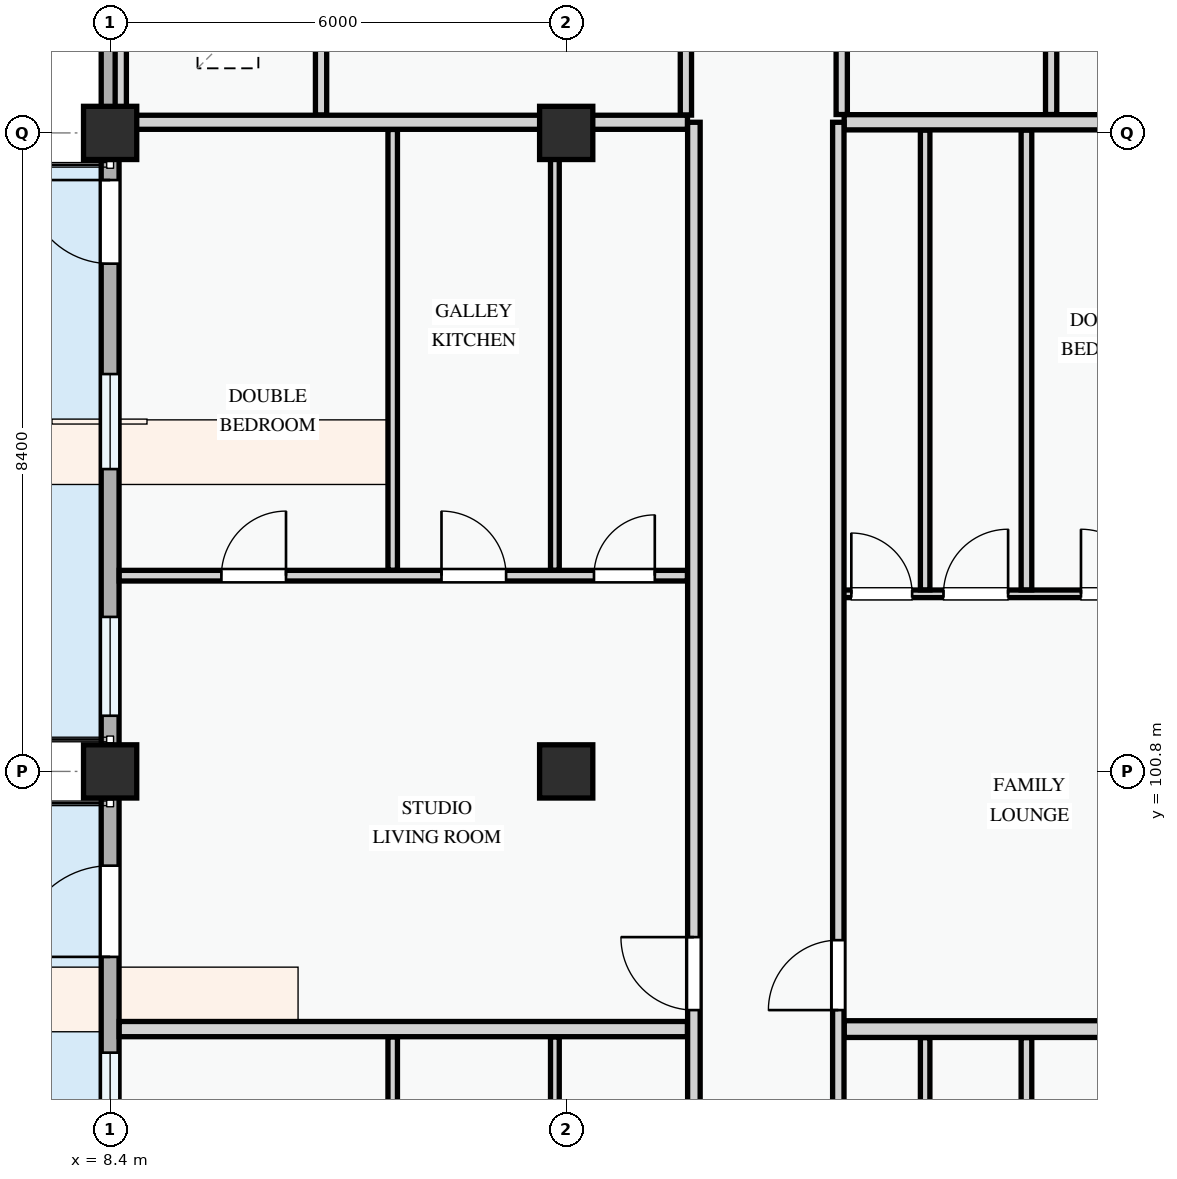
"""IFC4 building model, lengths in metres.
Left out: names, types, materials, properties, quantities, classifications, styles, units other than length and angle.
Written with IfcOpenShell. Run it as: python <this file> out.ifc"""

import sys

from ifc_helpers import new_model, si_unit, direction, frame, frame_2d, origin, origin_2d, place, context, subcontext, project, spatial, rectangle, extrude, element, fill, save


model = new_model("IFC4")
c1 = context("Model", 3, precision=1e-05, world=origin(), true_north=direction((0.0, 1.0)))
c2 = subcontext(c1, "Body", "Model", "MODEL_VIEW")
j1 = project(units=[si_unit("LENGTHUNIT", "METRE"), si_unit("PLANEANGLEUNIT", "RADIAN")], contexts=[c1])
p1 = place(None, origin())
s1 = spatial("IfcSite", under=j1, at=p1, CompositionType="ELEMENT")
p2 = place(p1, origin())
s2 = spatial("IfcBuilding", under=s1, at=p2, CompositionType="ELEMENT")
p3 = place(p2, frame((0.0, 0.0, 11.4)))
s3 = spatial("IfcBuildingStorey", under=s2, at=p3, CompositionType="ELEMENT", Elevation=11.4)
for number, where, z_axis, x_axis in (
    (1, (8.4, 100.8, 0.0), (0.0, 0.0, 1.0), (1.0, 0.0, 0.0)),
    (2, (8.4, 109.2, 0.0), (0.0, 0.0, 1.0), (1.0, 0.0, 0.0)),
    (3, (14.4, 100.8, 0.0), (0.0, 0.0, 1.0), (1.0, 0.0, 0.0)),
    (4, (14.4, 109.2, 0.0), (0.0, 0.0, 1.0), (1.0, 0.0, 0.0)),
):
    element("IfcColumn", number, at=place(p3, frame(where, z_axis=z_axis, x_axis=x_axis)), inside=s3, PredefinedType="COLUMN", context=c2, shape_type="SweptSolid", body=[
        extrude(rectangle(XDim=0.7, YDim=0.7, at=origin_2d()), origin(), (0.0, 0.0, 1.0), 3.3),
    ])
p4 = place(p3, frame((8.4, 115.2, 0.0), z_axis=(0.0, 0.0, 1.0), x_axis=(0.0, -1.0, 0.0)))
e5 = element("IfcWall", 5, at=p4, inside=s3, PredefinedType="STANDARD", context=c2, shape_type="SweptSolid", body=[
    extrude(rectangle(XDim=6.0, YDim=0.235, at=frame_2d((3.0, 0.0))), origin(), (0.0, 0.0, 1.0), 2.575),
])
p5 = place(p4, frame((0.545, 0.0, 0.78)))
e6 = element("IfcOpeningElement", 6, at=p5, cuts=e5, PredefinedType="OPENING", context=c2, shape_type="SweptSolid", body=[
    extrude(rectangle(XDim=0.9, YDim=1.2, at=frame_2d((0.45, 0.6))), frame((0.0, 0.127, 0.0), z_axis=(0.0, -1.0, 0.0), x_axis=(1.0, 0.0, 0.0)), (0.0, 0.0, 1.0), 0.255),
])
p6 = place(p4, frame((2.865, 0.0, 0.78)))
e7 = element("IfcOpeningElement", 7, at=p6, cuts=e5, PredefinedType="OPENING", context=c2, shape_type="SweptSolid", body=[
    extrude(rectangle(XDim=1.88, YDim=1.52, at=frame_2d((0.94, 0.76))), frame((0.0, 0.127, 0.0), z_axis=(0.0, -1.0, 0.0), x_axis=(1.0, 0.0, 0.0)), (0.0, 0.0, 1.0), 0.255),
])
p7 = place(p3, frame((8.4, 109.2, 0.0), z_axis=(0.0, 0.0, 1.0), x_axis=(0.0, -1.0, 0.0)))
e8 = element("IfcWall", 8, at=p7, inside=s3, PredefinedType="STANDARD", context=c2, shape_type="SweptSolid", body=[
    extrude(rectangle(XDim=8.4, YDim=0.235, at=frame_2d((4.2, 0.0))), origin(), (0.0, 0.0, 1.0), 2.425),
])
p8 = place(p7, frame((0.62, 0.0, 0.0)))
e9 = element("IfcOpeningElement", 9, at=p8, cuts=e8, PredefinedType="OPENING", context=c2, shape_type="SweptSolid", body=[
    extrude(rectangle(XDim=1.1, YDim=2.15, at=frame_2d((0.55, 1.075))), frame((0.0, 0.127, 0.0), z_axis=(0.0, -1.0, 0.0), x_axis=(1.0, 0.0, 0.0)), (0.0, 0.0, 1.0), 0.255),
])
p9 = place(p7, frame((3.173, 0.0, 0.78)))
e10 = element("IfcOpeningElement", 10, at=p9, cuts=e8, PredefinedType="OPENING", context=c2, shape_type="SweptSolid", body=[
    extrude(rectangle(XDim=1.25, YDim=1.45, at=frame_2d((0.625, 0.725))), frame((0.0, 0.127, 0.0), z_axis=(0.0, -1.0, 0.0), x_axis=(1.0, 0.0, 0.0)), (0.0, 0.0, 1.0), 0.255),
])
p10 = place(p7, frame((6.367, 0.0, 0.78)))
e11 = element("IfcOpeningElement", 11, at=p10, cuts=e8, PredefinedType="OPENING", context=c2, shape_type="SweptSolid", body=[
    extrude(rectangle(XDim=1.3, YDim=1.4, at=frame_2d((0.65, 0.7))), frame((0.0, 0.127, 0.0), z_axis=(0.0, -1.0, 0.0), x_axis=(1.0, 0.0, 0.0)), (0.0, 0.0, 1.0), 0.255),
])
p11 = place(p3, frame((8.4, 100.8, 0.0), z_axis=(0.0, 0.0, 1.0), x_axis=(0.0, -1.0, 0.0)))
e12 = element("IfcWall", 12, at=p11, inside=s3, PredefinedType="STANDARD", context=c2, shape_type="SweptSolid", body=[
    extrude(rectangle(XDim=6.0, YDim=0.235, at=frame_2d((3.0, 0.0))), origin(), (0.0, 0.0, 1.0), 2.575),
])
p12 = place(p11, frame((1.24, 0.0, 0.0)))
e13 = element("IfcOpeningElement", 13, at=p12, cuts=e12, PredefinedType="OPENING", context=c2, shape_type="SweptSolid", body=[
    extrude(rectangle(XDim=1.2, YDim=2.15, at=frame_2d((0.6, 1.075))), frame((0.0, 0.127, 0.0), z_axis=(0.0, -1.0, 0.0), x_axis=(1.0, 0.0, 0.0)), (0.0, 0.0, 1.0), 0.255),
])
p13 = place(p11, frame((3.7, 0.0, 0.78)))
e14 = element("IfcOpeningElement", 14, at=p13, cuts=e12, PredefinedType="OPENING", context=c2, shape_type="SweptSolid", body=[
    extrude(rectangle(XDim=1.8, YDim=1.5, at=frame_2d((0.9, 0.75))), frame((0.0, 0.127, 0.0), z_axis=(0.0, -1.0, 0.0), x_axis=(1.0, 0.0, 0.0)), (0.0, 0.0, 1.0), 0.255),
])
p14 = place(p3, frame((8.54, 113.324, 0.0), z_axis=(0.0, 0.0, 1.0), x_axis=(0.0, -1.0, 0.0)))
e15 = element("IfcWall", 15, at=p14, inside=s3, PredefinedType="PARTITIONING", context=c2, shape_type="SweptSolid", body=[
    extrude(rectangle(XDim=3.889, YDim=0.148, at=frame_2d((1.945, 0.0))), origin(), (0.0, 0.0, 1.0), 2.575),
])
for number, where, z_axis, x_axis in (
    (16, (11.175, 113.324, 0.0), (0.0, 0.0, 1.0), (0.0, -1.0, 0.0)),
    (17, (15.975, 113.324, 0.0), (0.0, 0.0, 1.0), (0.0, -1.0, 0.0)),
):
    element("IfcWall", number, at=place(p3, frame(where, z_axis=z_axis, x_axis=x_axis)), inside=s3, PredefinedType="PARTITIONING", context=c2, shape_type="SweptSolid", body=[
        extrude(rectangle(XDim=3.889, YDim=0.148, at=frame_2d((1.945, 0.0))), origin(), (0.0, 0.0, 1.0), 3.0),
    ])
for number, where, z_axis, x_axis in (
    (18, (18.025, 113.324, 0.0), (0.0, 0.0, 1.0), (0.0, -1.0, 0.0)),
    (19, (20.78, 113.324, 0.0), (0.0, 0.0, 1.0), (0.0, -1.0, 0.0)),
):
    element("IfcWall", number, at=place(p3, frame(where, z_axis=z_axis, x_axis=x_axis)), inside=s3, PredefinedType="PARTITIONING", context=c2, shape_type="SweptSolid", body=[
        extrude(rectangle(XDim=3.882, YDim=0.148, at=frame_2d((1.941, 0.0))), origin(), (0.0, 0.0, 1.0), 3.0),
    ])
p15 = place(p3, frame((12.118, 91.097, 0.0), z_axis=(0.0, 0.0, 1.0), x_axis=(0.0, 1.0, 0.0)))
e20 = element("IfcWall", 20, at=p15, inside=s3, PredefinedType="PARTITIONING", context=c2, shape_type="SweptSolid", body=[
    extrude(rectangle(XDim=6.211, YDim=0.125, at=frame_2d((3.105, 0.0))), origin(), (0.0, 0.0, 1.0), 3.0),
])
p16 = place(p3, frame((14.251, 91.097, 0.0), z_axis=(0.0, 0.0, 1.0), x_axis=(0.0, 1.0, 0.0)))
e21 = element("IfcWall", 21, at=p16, inside=s3, PredefinedType="PARTITIONING", context=c2, shape_type="SweptSolid", body=[
    extrude(rectangle(XDim=6.211, YDim=0.115, at=frame_2d((3.105, 0.0))), origin(), (0.0, 0.0, 1.0), 2.425),
])
p17 = place(p3, frame((20.455, 90.822, 0.0), z_axis=(0.0, 0.0, 1.0), x_axis=(0.0, 1.0, 0.0)))
e22 = element("IfcWall", 22, at=p17, inside=s3, PredefinedType="PARTITIONING", context=c2, shape_type="SweptSolid", body=[
    extrude(rectangle(XDim=6.477, YDim=0.14, at=frame_2d((3.238, 0.0))), origin(), (0.0, 0.0, 1.0), 3.0),
])
p18 = place(p3, frame((19.122, 90.822, 0.0), z_axis=(0.0, 0.0, 1.0), x_axis=(0.0, 1.0, 0.0)))
e23 = element("IfcWall", 23, at=p18, inside=s3, PredefinedType="PARTITIONING", context=c2, shape_type="SweptSolid", body=[
    extrude(rectangle(XDim=6.477, YDim=0.125, at=frame_2d((3.238, 0.0))), origin(), (0.0, 0.0, 1.0), 3.0),
])
p19 = place(p3, frame((8.52, 103.375, 0.0), z_axis=(0.0, 0.0, 1.0), x_axis=(1.0, 0.0, 0.0)))
e24 = element("IfcWall", 24, at=p19, inside=s3, PredefinedType="PARTITIONING", context=c2, shape_type="SweptSolid", body=[
    extrude(rectangle(XDim=7.476, YDim=0.14, at=frame_2d((3.738, 0.0))), origin(), (0.0, 0.0, 1.0), 3.0),
])
p20 = place(p19, frame((1.344, 0.0, 0.0)))
e25 = element("IfcOpeningElement", 25, at=p20, cuts=e24, PredefinedType="OPENING", context=c2, shape_type="SweptSolid", body=[
    extrude(rectangle(XDim=0.85, YDim=2.1, at=frame_2d((0.425, 1.05))), frame((0.0, 0.08, 0.0), z_axis=(0.0, -1.0, 0.0), x_axis=(1.0, 0.0, 0.0)), (0.0, 0.0, 1.0), 0.16),
])
p21 = place(p19, frame((4.24, 0.0, 0.0)))
e26 = element("IfcOpeningElement", 26, at=p21, cuts=e24, PredefinedType="OPENING", context=c2, shape_type="SweptSolid", body=[
    extrude(rectangle(XDim=0.85, YDim=2.1, at=frame_2d((0.425, 1.05))), frame((0.0, 0.08, 0.0), z_axis=(0.0, -1.0, 0.0), x_axis=(1.0, 0.0, 0.0)), (0.0, 0.0, 1.0), 0.16),
])
p22 = place(p19, frame((6.246, 0.0, 0.0)))
e27 = element("IfcOpeningElement", 27, at=p22, cuts=e24, PredefinedType="OPENING", context=c2, shape_type="SweptSolid", body=[
    extrude(rectangle(XDim=0.8, YDim=2.1, at=frame_2d((0.4, 1.05))), frame((0.0, 0.08, 0.0), z_axis=(0.0, -1.0, 0.0), x_axis=(1.0, 0.0, 0.0)), (0.0, 0.0, 1.0), 0.16),
])
p23 = place(p3, frame((12.118, 103.447, 0.0), z_axis=(0.0, 0.0, 1.0), x_axis=(0.0, 1.0, 0.0)))
e28 = element("IfcWall", 28, at=p23, inside=s3, PredefinedType="PARTITIONING", context=c2, shape_type="SweptSolid", body=[
    extrude(rectangle(XDim=5.799, YDim=0.125, at=frame_2d((2.899, 0.0))), origin(), (0.0, 0.0, 1.0), 3.0),
])
p24 = place(p3, frame((14.251, 103.447, 0.0), z_axis=(0.0, 0.0, 1.0), x_axis=(0.0, 1.0, 0.0)))
e29 = element("IfcWall", 29, at=p24, inside=s3, PredefinedType="PARTITIONING", context=c2, shape_type="SweptSolid", body=[
    extrude(rectangle(XDim=5.799, YDim=0.115, at=frame_2d((2.899, 0.0))), origin(), (0.0, 0.0, 1.0), 2.425),
])
p25 = place(p3, frame((17.98, 103.136, 0.0), z_axis=(0.0, 0.0, 1.0), x_axis=(1.0, 0.0, 0.0)))
e30 = element("IfcWall", 30, at=p25, inside=s3, PredefinedType="PARTITIONING", context=c2, shape_type="SweptSolid", body=[
    extrude(rectangle(XDim=4.7, YDim=0.1, at=frame_2d((2.35, 0.0))), origin(), (0.0, 0.0, 1.0), 3.0),
])
p26 = place(p25, frame((0.171, 0.0, 0.0)))
e31 = element("IfcOpeningElement", 31, at=p26, cuts=e30, PredefinedType="OPENING", context=c2, shape_type="SweptSolid", body=[
    extrude(rectangle(XDim=0.8, YDim=2.1, at=frame_2d((0.4, 1.05))), frame((0.0, 0.06, 0.0), z_axis=(0.0, -1.0, 0.0), x_axis=(1.0, 0.0, 0.0)), (0.0, 0.0, 1.0), 0.12),
])
p27 = place(p25, frame((1.384, 0.0, 0.0)))
e32 = element("IfcOpeningElement", 32, at=p27, cuts=e30, PredefinedType="OPENING", context=c2, shape_type="SweptSolid", body=[
    extrude(rectangle(XDim=0.85, YDim=2.1, at=frame_2d((0.425, 1.05))), frame((0.0, 0.06, 0.0), z_axis=(0.0, -1.0, 0.0), x_axis=(1.0, 0.0, 0.0)), (0.0, 0.0, 1.0), 0.12),
])
p28 = place(p25, frame((3.193, 0.0, 0.0)))
e33 = element("IfcOpeningElement", 33, at=p28, cuts=e30, PredefinedType="OPENING", context=c2, shape_type="SweptSolid", body=[
    extrude(rectangle(XDim=0.85, YDim=2.1, at=frame_2d((0.425, 1.05))), frame((0.0, 0.06, 0.0), z_axis=(0.0, -1.0, 0.0), x_axis=(1.0, 0.0, 0.0)), (0.0, 0.0, 1.0), 0.12),
])
p29 = place(p3, frame((20.455, 103.188, 0.0), z_axis=(0.0, 0.0, 1.0), x_axis=(0.0, 1.0, 0.0)))
e34 = element("IfcWall", 34, at=p29, inside=s3, PredefinedType="PARTITIONING", context=c2, shape_type="SweptSolid", body=[
    extrude(rectangle(XDim=6.05, YDim=0.14, at=frame_2d((3.025, 0.0))), origin(), (0.0, 0.0, 1.0), 3.0),
])
p30 = place(p3, frame((19.122, 103.188, 0.0), z_axis=(0.0, 0.0, 1.0), x_axis=(0.0, 1.0, 0.0)))
e35 = element("IfcWall", 35, at=p30, inside=s3, PredefinedType="PARTITIONING", context=c2, shape_type="SweptSolid", body=[
    extrude(rectangle(XDim=6.05, YDim=0.125, at=frame_2d((3.025, 0.0))), origin(), (0.0, 0.0, 1.0), 3.0),
])
p31 = place(p3, frame((8.52, 97.41, 0.0), z_axis=(0.0, 0.0, 1.0), x_axis=(1.0, 0.0, 0.0)))
e36 = element("IfcWall", 36, at=p31, inside=s3, PredefinedType="PARTITIONING", context=c2, shape_type="SweptSolid", body=[
    extrude(rectangle(XDim=7.476, YDim=0.2, at=frame_2d((3.738, 0.0))), origin(), (0.0, 0.0, 1.0), 3.0),
])
p32 = place(p3, frame((18.057, 97.41, 0.0), z_axis=(0.0, 0.0, 1.0), x_axis=(1.0, 0.0, 0.0)))
e37 = element("IfcWall", 37, at=p32, inside=s3, PredefinedType="PARTITIONING", context=c2, shape_type="SweptSolid", body=[
    extrude(rectangle(XDim=4.624, YDim=0.22, at=frame_2d((2.312, 0.0))), origin(), (0.0, 0.0, 1.0), 3.0),
])
p33 = place(p3, frame((8.52, 109.34, 0.0), z_axis=(0.0, 0.0, 1.0), x_axis=(1.0, 0.0, 0.0)))
e38 = element("IfcWall", 38, at=p33, inside=s3, PredefinedType="PARTITIONING", context=c2, shape_type="SweptSolid", body=[
    extrude(rectangle(XDim=7.476, YDim=0.185, at=frame_2d((3.738, 0.0))), origin(), (0.0, 0.0, 1.0), 2.375),
])
p34 = place(p3, frame((18.057, 109.34, 0.0), z_axis=(0.0, 0.0, 1.0), x_axis=(1.0, 0.0, 0.0)))
e39 = element("IfcWall", 39, at=p34, inside=s3, PredefinedType="PARTITIONING", context=c2, shape_type="SweptSolid", body=[
    extrude(rectangle(XDim=4.683, YDim=0.2, at=frame_2d((2.342, 0.0))), origin(), (0.0, 0.0, 1.0), 2.375),
])
p35 = place(p3, frame((16.08, 72.06, 0.0), z_axis=(0.0, 0.0, 1.0), x_axis=(0.0, 1.0, 0.0)))
e40 = element("IfcWall", 40, at=p35, inside=s3, PredefinedType="PARTITIONING", context=c2, shape_type="SweptSolid", body=[
    extrude(rectangle(XDim=37.28, YDim=0.165, at=frame_2d((18.64, 0.0))), origin(), (0.0, 0.0, 1.0), 3.0),
])
p36 = place(p35, frame((3.722, 0.0, 0.0)))
e41 = element("IfcOpeningElement", 41, at=p36, cuts=e40, PredefinedType="OPENING", context=c2, shape_type="SweptSolid", body=[
    extrude(rectangle(XDim=0.92, YDim=2.1, at=frame_2d((0.46, 1.05))), frame((0.0, 0.093, 0.0), z_axis=(0.0, -1.0, 0.0), x_axis=(1.0, 0.0, 0.0)), (0.0, 0.0, 1.0), 0.185),
])
p37 = place(p35, frame((17.755, 0.0, 0.0)))
e42 = element("IfcOpeningElement", 42, at=p37, cuts=e40, PredefinedType="OPENING", context=c2, shape_type="SweptSolid", body=[
    extrude(rectangle(XDim=0.92, YDim=2.1, at=frame_2d((0.46, 1.05))), frame((0.0, 0.093, 0.0), z_axis=(0.0, -1.0, 0.0), x_axis=(1.0, 0.0, 0.0)), (0.0, 0.0, 1.0), 0.185),
])
p38 = place(p35, frame((25.6, 0.0, 0.0)))
e43 = element("IfcOpeningElement", 43, at=p38, cuts=e40, PredefinedType="OPENING", context=c2, shape_type="SweptSolid", body=[
    extrude(rectangle(XDim=0.96, YDim=2.12, at=frame_2d((0.48, 1.06))), frame((0.0, 0.093, 0.0), z_axis=(0.0, -1.0, 0.0), x_axis=(1.0, 0.0, 0.0)), (0.0, 0.0, 1.0), 0.185),
])
p39 = place(p3, frame((17.98, 72.06, 0.0), z_axis=(0.0, 0.0, 1.0), x_axis=(0.0, 1.0, 0.0)))
e44 = element("IfcWall", 44, at=p39, inside=s3, PredefinedType="PARTITIONING", context=c2, shape_type="SweptSolid", body=[
    extrude(rectangle(XDim=37.28, YDim=0.15, at=frame_2d((18.64, 0.0))), origin(), (0.0, 0.0, 1.0), 3.0),
])
p40 = place(p39, frame((3.684, 0.0, 0.0)))
e45 = element("IfcOpeningElement", 45, at=p40, cuts=e44, PredefinedType="OPENING", context=c2, shape_type="SweptSolid", body=[
    extrude(rectangle(XDim=0.92, YDim=2.1, at=frame_2d((0.46, 1.05))), frame((0.0, 0.085, 0.0), z_axis=(0.0, -1.0, 0.0), x_axis=(1.0, 0.0, 0.0)), (0.0, 0.0, 1.0), 0.17),
])
p41 = place(p39, frame((17.5, 0.0, 0.0)))
e46 = element("IfcOpeningElement", 46, at=p41, cuts=e44, PredefinedType="OPENING", context=c2, shape_type="SweptSolid", body=[
    extrude(rectangle(XDim=0.92, YDim=2.1, at=frame_2d((0.46, 1.05))), frame((0.0, 0.085, 0.0), z_axis=(0.0, -1.0, 0.0), x_axis=(1.0, 0.0, 0.0)), (0.0, 0.0, 1.0), 0.17),
])
p42 = place(p39, frame((25.6, 0.0, 0.0)))
e47 = element("IfcOpeningElement", 47, at=p42, cuts=e44, PredefinedType="OPENING", context=c2, shape_type="SweptSolid", body=[
    extrude(rectangle(XDim=0.92, YDim=2.1, at=frame_2d((0.46, 1.05))), frame((0.0, 0.085, 0.0), z_axis=(0.0, -1.0, 0.0), x_axis=(1.0, 0.0, 0.0)), (0.0, 0.0, 1.0), 0.17),
])
p43 = place(p8, frame((1.1, 0.0, 0.0), z_axis=(0.0, 0.0, 1.0), x_axis=(-1.0, 0.0, 0.0)))
e48 = element("IfcDoor", 48, at=p43, inside=s3, OperationType="SINGLE_SWING_RIGHT", PredefinedType="DOOR", context=c2, shape_type="SweptSolid", body=[
    extrude(rectangle(XDim=1.1, YDim=2.15, at=frame_2d((0.55, 1.075))), frame((0.0, 0.025, 0.0), z_axis=(0.0, -1.0, 0.0), x_axis=(1.0, 0.0, 0.0)), (0.0, 0.0, 1.0), 0.05),
])
fill(e9, e48)
p44 = place(p9, origin())
e49 = element("IfcWindow", 49, at=p44, inside=s3, PartitioningType="SINGLE_PANEL", PredefinedType="WINDOW", context=c2, shape_type="SweptSolid", body=[
    extrude(rectangle(XDim=1.25, YDim=1.45, at=frame_2d((0.625, 0.725))), frame((0.0, 0.03, 0.0), z_axis=(0.0, -1.0, 0.0), x_axis=(1.0, 0.0, 0.0)), (0.0, 0.0, 1.0), 0.06),
])
fill(e10, e49)
p45 = place(p10, origin())
e50 = element("IfcWindow", 50, at=p45, inside=s3, PartitioningType="SINGLE_PANEL", PredefinedType="WINDOW", context=c2, shape_type="SweptSolid", body=[
    extrude(rectangle(XDim=1.3, YDim=1.4, at=frame_2d((0.65, 0.7))), frame((0.0, 0.03, 0.0), z_axis=(0.0, -1.0, 0.0), x_axis=(1.0, 0.0, 0.0)), (0.0, 0.0, 1.0), 0.06),
])
fill(e11, e50)
p46 = place(p12, frame((1.2, 0.0, 0.0), z_axis=(0.0, 0.0, 1.0), x_axis=(-1.0, 0.0, 0.0)))
e51 = element("IfcDoor", 51, at=p46, inside=s3, OperationType="SINGLE_SWING_LEFT", PredefinedType="DOOR", context=c2, shape_type="SweptSolid", body=[
    extrude(rectangle(XDim=1.2, YDim=2.15, at=frame_2d((0.6, 1.075))), frame((0.0, 0.025, 0.0), z_axis=(0.0, -1.0, 0.0), x_axis=(1.0, 0.0, 0.0)), (0.0, 0.0, 1.0), 0.05),
])
fill(e13, e51)
p47 = place(p13, origin())
e52 = element("IfcWindow", 52, at=p47, inside=s3, PartitioningType="DOUBLE_PANEL_VERTICAL", PredefinedType="WINDOW", context=c2, shape_type="SweptSolid", body=[
    extrude(rectangle(XDim=1.8, YDim=1.5, at=frame_2d((0.9, 0.75))), frame((0.0, 0.03, 0.0), z_axis=(0.0, -1.0, 0.0), x_axis=(1.0, 0.0, 0.0)), (0.0, 0.0, 1.0), 0.06),
])
fill(e14, e52)
p48 = place(p20, origin())
e53 = element("IfcDoor", 53, at=p48, inside=s3, OperationType="SINGLE_SWING_RIGHT", PredefinedType="DOOR", context=c2, shape_type="SweptSolid", body=[
    extrude(rectangle(XDim=0.85, YDim=2.1, at=frame_2d((0.425, 1.05))), frame((0.0, 0.025, 0.0), z_axis=(0.0, -1.0, 0.0), x_axis=(1.0, 0.0, 0.0)), (0.0, 0.0, 1.0), 0.05),
])
fill(e25, e53)
p49 = place(p21, origin())
e54 = element("IfcDoor", 54, at=p49, inside=s3, OperationType="SINGLE_SWING_LEFT", PredefinedType="DOOR", context=c2, shape_type="SweptSolid", body=[
    extrude(rectangle(XDim=0.85, YDim=2.1, at=frame_2d((0.425, 1.05))), frame((0.0, 0.025, 0.0), z_axis=(0.0, -1.0, 0.0), x_axis=(1.0, 0.0, 0.0)), (0.0, 0.0, 1.0), 0.05),
])
fill(e26, e54)
p50 = place(p22, origin())
e55 = element("IfcDoor", 55, at=p50, inside=s3, OperationType="SINGLE_SWING_RIGHT", PredefinedType="DOOR", context=c2, shape_type="SweptSolid", body=[
    extrude(rectangle(XDim=0.8, YDim=2.1, at=frame_2d((0.4, 1.05))), frame((0.0, 0.025, 0.0), z_axis=(0.0, -1.0, 0.0), x_axis=(1.0, 0.0, 0.0)), (0.0, 0.0, 1.0), 0.05),
])
fill(e27, e55)
p51 = place(p26, origin())
e56 = element("IfcDoor", 56, at=p51, inside=s3, OperationType="SINGLE_SWING_LEFT", PredefinedType="DOOR", context=c2, shape_type="SweptSolid", body=[
    extrude(rectangle(XDim=0.8, YDim=2.1, at=frame_2d((0.4, 1.05))), frame((0.0, 0.025, 0.0), z_axis=(0.0, -1.0, 0.0), x_axis=(1.0, 0.0, 0.0)), (0.0, 0.0, 1.0), 0.05),
])
fill(e31, e56)
p52 = place(p27, origin())
e57 = element("IfcDoor", 57, at=p52, inside=s3, OperationType="SINGLE_SWING_RIGHT", PredefinedType="DOOR", context=c2, shape_type="SweptSolid", body=[
    extrude(rectangle(XDim=0.85, YDim=2.1, at=frame_2d((0.425, 1.05))), frame((0.0, 0.025, 0.0), z_axis=(0.0, -1.0, 0.0), x_axis=(1.0, 0.0, 0.0)), (0.0, 0.0, 1.0), 0.05),
])
fill(e32, e57)
p53 = place(p28, origin())
e58 = element("IfcDoor", 58, at=p53, inside=s3, OperationType="SINGLE_SWING_LEFT", PredefinedType="DOOR", context=c2, shape_type="SweptSolid", body=[
    extrude(rectangle(XDim=0.85, YDim=2.1, at=frame_2d((0.425, 1.05))), frame((0.0, 0.025, 0.0), z_axis=(0.0, -1.0, 0.0), x_axis=(1.0, 0.0, 0.0)), (0.0, 0.0, 1.0), 0.05),
])
fill(e33, e58)
p54 = place(p38, origin())
e59 = element("IfcDoor", 59, at=p54, inside=s3, OperationType="SINGLE_SWING_RIGHT", PredefinedType="DOOR", context=c2, shape_type="SweptSolid", body=[
    extrude(rectangle(XDim=0.96, YDim=2.12, at=frame_2d((0.48, 1.06))), frame((0.0, 0.025, 0.0), z_axis=(0.0, -1.0, 0.0), x_axis=(1.0, 0.0, 0.0)), (0.0, 0.0, 1.0), 0.05),
])
fill(e43, e59)
p55 = place(p42, origin())
e60 = element("IfcDoor", 60, at=p55, inside=s3, OperationType="SINGLE_SWING_LEFT", PredefinedType="DOOR", context=c2, shape_type="SweptSolid", body=[
    extrude(rectangle(XDim=0.92, YDim=2.1, at=frame_2d((0.46, 1.05))), frame((0.0, 0.025, 0.0), z_axis=(0.0, -1.0, 0.0), x_axis=(1.0, 0.0, 0.0)), (0.0, 0.0, 1.0), 0.05),
])
fill(e47, e60)
save(model, sys.argv[1])
